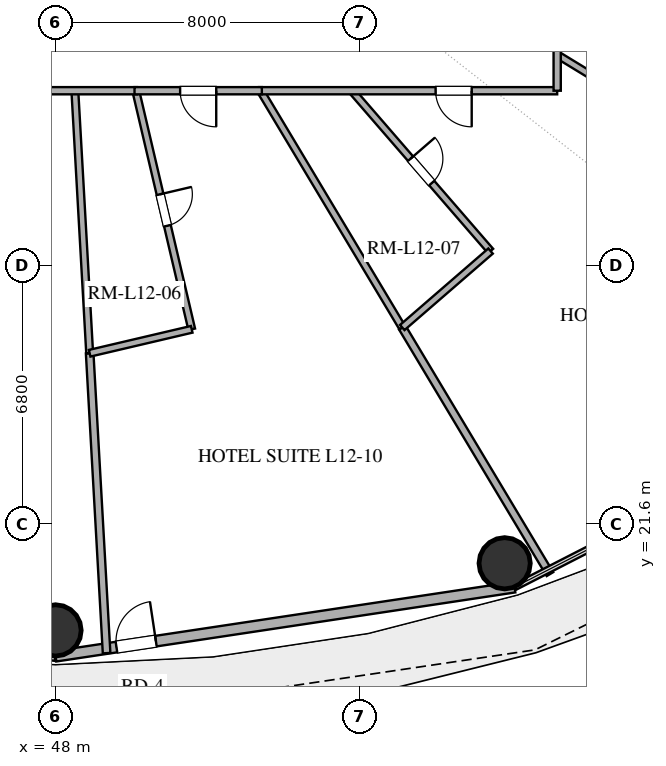
"""IFC4 building model, lengths in metres.
Left out: names, types, materials, properties, quantities, classifications, styles, units other than length and angle.
Written with IfcOpenShell. Run it as: python <this file> out.ifc"""

import sys

from ifc_helpers import new_model, si_unit, direction, frame, frame_2d, origin, origin_2d, place, context, subcontext, project, spatial, rectangle, hollow_circle, extrude, element, fill, save


model = new_model("IFC4")
c1 = context("Model", 3, precision=1e-05, world=origin(), true_north=direction((0.0, 1.0)))
c2 = subcontext(c1, "Body", "Model", "MODEL_VIEW")
j1 = project(units=[si_unit("LENGTHUNIT", "METRE"), si_unit("PLANEANGLEUNIT", "RADIAN")], contexts=[c1])
p1 = place(None, origin())
s1 = spatial("IfcSite", under=j1, at=p1, CompositionType="ELEMENT")
p2 = place(p1, origin())
s2 = spatial("IfcBuilding", under=s1, at=p2, CompositionType="ELEMENT")
p3 = place(p2, frame((0.0, 0.0, 53.4)))
s3 = spatial("IfcBuildingStorey", under=s2, at=p3, CompositionType="ELEMENT", Elevation=53.4)
for number, where, z_axis, x_axis in (
    (1, (48.0, 18.8, 0.0), (0.0, 0.0, 1.0), (1.0, 0.0, 0.0)),
    (2, (59.818, 20.566, 0.0), (0.0, 0.0, 1.0), (1.0, 0.0, 0.0)),
):
    element("IfcColumn", number, at=place(p3, frame(where, z_axis=z_axis, x_axis=x_axis)), inside=s3, PredefinedType="COLUMN", context=c2, shape_type="SweptSolid", body=[
        extrude(hollow_circle(Radius=0.675, WallThickness=0.036, at=origin_2d()), origin(), (0.0, 0.0, 1.0), 3.38),
    ])
p4 = place(p3, frame((35.922, 19.938, 0.0), z_axis=(0.0, 0.0, 1.0), x_axis=(0.988864835849, -0.148816452121, 0.0)))
e3 = element("IfcWall", 3, at=p4, inside=s3, PredefinedType="SOLIDWALL", context=c2, shape_type="SweptSolid", body=[
    extrude(rectangle(XDim=12.214, YDim=0.25, at=frame_2d((6.107, 0.0))), origin(), (0.0, 0.0, 1.0), 3.38),
])
p5 = place(p4, frame((2.139, 0.0, 1.42)))
e4 = element("IfcOpeningElement", 4, at=p5, cuts=e3, PredefinedType="OPENING", context=c2, shape_type="SweptSolid", body=[
    extrude(rectangle(XDim=1.0, YDim=1.05, at=frame_2d((0.5, 0.525))), frame((0.0, 0.135, 0.0), z_axis=(0.0, -1.0, 0.0), x_axis=(1.0, 0.0, 0.0)), (0.0, 0.0, 1.0), 0.27),
])
p6 = place(p3, frame((48.0, 18.12, 0.0), z_axis=(0.0, 0.0, 1.0), x_axis=(0.988864835849, 0.148816452121, 0.0)))
e5 = element("IfcWall", 5, at=p6, inside=s3, PredefinedType="SOLIDWALL", context=c2, shape_type="SweptSolid", body=[
    extrude(rectangle(XDim=12.214, YDim=0.28, at=frame_2d((6.107, 0.0))), origin(), (0.0, 0.0, 1.0), 3.38),
])
p7 = place(p6, frame((1.621, 0.0, 0.0)))
e6 = element("IfcOpeningElement", 6, at=p7, cuts=e5, PredefinedType="OPENING", context=c2, shape_type="SweptSolid", body=[
    extrude(rectangle(XDim=1.05, YDim=2.2, at=frame_2d((0.525, 1.1))), frame((0.0, 0.15, 0.0), z_axis=(0.0, -1.0, 0.0), x_axis=(1.0, 0.0, 0.0)), (0.0, 0.0, 1.0), 0.3),
])
p8 = place(p3, frame((49.344, 18.201, 0.0), z_axis=(0.0, 0.0, 1.0), x_axis=(-0.056375038978, 0.998409662904, 0.0)))
e7 = element("IfcWall", 7, at=p8, inside=s3, PredefinedType="PARTITIONING", context=c2, shape_type="SweptSolid", body=[
    extrude(rectangle(XDim=7.903, YDim=0.2, at=frame_2d((3.952, 0.0))), origin(), (0.0, 0.0, 1.0), 2.74),
])
p9 = place(p3, frame((61.01, 20.281, 0.0), z_axis=(0.0, 0.0, 1.0), x_axis=(-0.513892719639, 0.857854458928, 0.0)))
e8 = element("IfcWall", 8, at=p9, inside=s3, PredefinedType="PARTITIONING", context=c2, shape_type="SweptSolid", body=[
    extrude(rectangle(XDim=7.563, YDim=0.2, at=frame_2d((3.781, 0.0))), origin(), (0.0, 0.0, 1.0), 2.74),
])
p10 = place(p3, frame((57.124, 26.769, 0.0), z_axis=(0.0, 0.0, 1.0), x_axis=(-0.513872793929, 0.857866394994, 0.0)))
e9 = element("IfcWall", 9, at=p10, inside=s3, PredefinedType="PLUMBINGWALL", context=c2, shape_type="SweptSolid", body=[
    extrude(rectangle(XDim=7.263, YDim=0.18, at=frame_2d((3.632, 0.0))), origin(), (0.0, 0.0, 1.0), 2.74),
])
p11 = place(p3, frame((48.898, 26.092, 0.0), z_axis=(0.0, 0.0, 1.0), x_axis=(-0.056353367692, 0.998410886334, 0.0)))
e10 = element("IfcWall", 10, at=p11, inside=s3, PredefinedType="PLUMBINGWALL", context=c2, shape_type="SweptSolid", body=[
    extrude(rectangle(XDim=6.919, YDim=0.18, at=frame_2d((3.459, 0.0))), origin(), (0.0, 0.0, 1.0), 2.74),
])
p12 = place(p3, frame((50.111, 33.0, 0.0), z_axis=(0.0, 0.0, 1.0), x_axis=(0.228380862789, -0.973571867666, 0.0)))
e11 = element("IfcWall", 11, at=p12, inside=s3, PredefinedType="PLUMBINGWALL", context=c2, shape_type="SweptSolid", body=[
    extrude(rectangle(XDim=6.448, YDim=0.18, at=frame_2d((3.224, 0.0))), origin(), (0.0, 0.0, 1.0), 2.74),
])
p13 = place(p12, frame((2.799, 0.0, 0.0)))
e12 = element("IfcOpeningElement", 12, at=p13, cuts=e11, PredefinedType="OPENING", context=c2, shape_type="SweptSolid", body=[
    extrude(rectangle(XDim=0.85, YDim=2.1, at=frame_2d((0.425, 1.05))), frame((0.0, 0.1, 0.0), z_axis=(0.0, -1.0, 0.0), x_axis=(1.0, 0.0, 0.0)), (0.0, 0.0, 1.0), 0.2),
])
p14 = place(p3, frame((66.323, 30.822, 0.0), z_axis=(0.0, 0.0, 1.0), x_axis=(-0.853693843866, 0.52077521153, 0.0)))
e13 = element("IfcWall", 13, at=p14, inside=s3, PredefinedType="PLUMBINGWALL", context=c2, shape_type="SweptSolid", body=[
    extrude(rectangle(XDim=6.002, YDim=0.18, at=frame_2d((3.001, 0.0))), origin(), (0.0, 0.0, 1.0), 2.74),
])
p15 = place(p3, frame((55.794, 33.0, 0.0), z_axis=(0.0, 0.0, 1.0), x_axis=(0.654630697525, -0.755948840767, 0.0)))
e14 = element("IfcWall", 14, at=p15, inside=s3, PredefinedType="PLUMBINGWALL", context=c2, shape_type="SweptSolid", body=[
    extrude(rectangle(XDim=5.581, YDim=0.18, at=frame_2d((2.791, 0.0))), origin(), (0.0, 0.0, 1.0), 2.74),
])
p16 = place(p15, frame((2.365, 0.0, 0.0)))
e15 = element("IfcOpeningElement", 15, at=p16, cuts=e14, PredefinedType="OPENING", context=c2, shape_type="SweptSolid", body=[
    extrude(rectangle(XDim=0.85, YDim=2.1, at=frame_2d((0.425, 1.05))), frame((0.0, 0.1, 0.0), z_axis=(0.0, -1.0, 0.0), x_axis=(1.0, 0.0, 0.0)), (0.0, 0.0, 1.0), 0.2),
])
p17 = place(p3, frame((61.2, 33.0, 0.0), z_axis=(0.0, 0.0, 1.0), x_axis=(-1.0, 0.0, 0.0)))
e16 = element("IfcWall", 16, at=p17, inside=s3, PredefinedType="PARTITIONING", context=c2, shape_type="SweptSolid", body=[
    extrude(rectangle(XDim=7.846, YDim=0.19, at=frame_2d((3.923, 0.0))), origin(), (0.0, 0.0, 1.0), 2.74),
])
p18 = place(p17, frame((2.249, 0.0, 0.0)))
e17 = element("IfcOpeningElement", 17, at=p18, cuts=e16, PredefinedType="OPENING", context=c2, shape_type="SweptSolid", body=[
    extrude(rectangle(XDim=0.95, YDim=2.15, at=frame_2d((0.475, 1.075))), frame((0.0, 0.105, 0.0), z_axis=(0.0, -1.0, 0.0), x_axis=(1.0, 0.0, 0.0)), (0.0, 0.0, 1.0), 0.21),
])
p19 = place(p3, frame((50.144, 33.0, 0.0), z_axis=(0.0, 0.0, 1.0), x_axis=(-1.0, 0.0, 0.0)))
e18 = element("IfcWall", 18, at=p19, inside=s3, PredefinedType="PARTITIONING", context=c2, shape_type="SweptSolid", body=[
    extrude(rectangle(XDim=15.344, YDim=0.19, at=frame_2d((7.672, 0.0))), origin(), (0.0, 0.0, 1.0), 2.74),
])
p20 = place(p19, frame((3.438, 0.0, 0.0)))
e19 = element("IfcOpeningElement", 19, at=p20, cuts=e18, PredefinedType="OPENING", context=c2, shape_type="SweptSolid", body=[
    extrude(rectangle(XDim=1.0, YDim=2.2, at=frame_2d((0.5, 1.1))), frame((0.0, 0.105, 0.0), z_axis=(0.0, -1.0, 0.0), x_axis=(1.0, 0.0, 0.0)), (0.0, 0.0, 1.0), 0.21),
])
p21 = place(p19, frame((7.798, 0.0, 0.0)))
e20 = element("IfcOpeningElement", 20, at=p21, cuts=e18, PredefinedType="OPENING", context=c2, shape_type="SweptSolid", body=[
    extrude(rectangle(XDim=0.95, YDim=2.15, at=frame_2d((0.475, 1.075))), frame((0.0, 0.105, 0.0), z_axis=(0.0, -1.0, 0.0), x_axis=(1.0, 0.0, 0.0)), (0.0, 0.0, 1.0), 0.21),
])
p22 = place(p3, frame((61.2, 41.18, 0.0), z_axis=(0.0, 0.0, 1.0), x_axis=(0.0, -1.0, 0.0)))
e21 = element("IfcWall", 21, at=p22, inside=s3, PredefinedType="PARTITIONING", context=c2, shape_type="SweptSolid", body=[
    extrude(rectangle(XDim=8.18, YDim=0.19, at=frame_2d((4.09, 0.0))), origin(), (0.0, 0.0, 1.0), 2.74),
])
p23 = place(p22, frame((1.721, 0.0, 0.0)))
e22 = element("IfcOpeningElement", 22, at=p23, cuts=e21, PredefinedType="OPENING", context=c2, shape_type="SweptSolid", body=[
    extrude(rectangle(XDim=0.95, YDim=2.15, at=frame_2d((0.475, 1.075))), frame((0.0, 0.105, 0.0), z_axis=(0.0, -1.0, 0.0), x_axis=(1.0, 0.0, 0.0)), (0.0, 0.0, 1.0), 0.21),
])
p24 = place(p3, frame((53.429, 33.0, 0.0), z_axis=(0.0, 0.0, 1.0), x_axis=(-1.0, 0.0, 0.0)))
e23 = element("IfcWall", 23, at=p24, inside=s3, PredefinedType="PARTITIONING", context=c2, shape_type="SweptSolid", body=[
    extrude(rectangle(XDim=3.351, YDim=0.19, at=frame_2d((1.675, 0.0))), origin(), (0.0, 0.0, 1.0), 2.74),
])
p25 = place(p24, frame((1.2, 0.0, 0.0)))
e24 = element("IfcOpeningElement", 24, at=p25, cuts=e23, PredefinedType="OPENING", context=c2, shape_type="SweptSolid", body=[
    extrude(rectangle(XDim=0.95, YDim=2.15, at=frame_2d((0.475, 1.075))), frame((0.0, 0.105, 0.0), z_axis=(0.0, -1.0, 0.0), x_axis=(1.0, 0.0, 0.0)), (0.0, 0.0, 1.0), 0.21),
])
p26 = place(p3, frame((59.447, 28.781, 0.0), z_axis=(0.0, 0.0, 1.0), x_axis=(-0.755927521829, -0.654655315217, 0.0)))
e25 = element("IfcWall", 25, at=p26, inside=s3, PredefinedType="PLUMBINGWALL", context=c2, shape_type="SweptSolid", body=[
    extrude(rectangle(XDim=3.074, YDim=0.18, at=frame_2d((1.537, 0.0))), origin(), (0.0, 0.0, 1.0), 2.74),
])
p27 = place(p3, frame((51.583, 26.722, 0.0), z_axis=(0.0, 0.0, 1.0), x_axis=(-0.973579428385, -0.228348629567, 0.0)))
e26 = element("IfcWall", 26, at=p27, inside=s3, PredefinedType="PLUMBINGWALL", context=c2, shape_type="SweptSolid", body=[
    extrude(rectangle(XDim=2.759, YDim=0.18, at=frame_2d((1.379, 0.0))), origin(), (0.0, 0.0, 1.0), 2.74),
])
p28 = place(p7, origin())
e27 = element("IfcDoor", 27, at=p28, inside=s3, OperationType="SINGLE_SWING_RIGHT", PredefinedType="DOOR", context=c2, shape_type="SweptSolid", body=[
    extrude(rectangle(XDim=1.05, YDim=2.2, at=frame_2d((0.525, 1.1))), frame((0.0, 0.025, 0.0), z_axis=(0.0, -1.0, 0.0), x_axis=(1.0, 0.0, 0.0)), (0.0, 0.0, 1.0), 0.05),
])
fill(e6, e27)
p29 = place(p13, origin())
e28 = element("IfcDoor", 28, at=p29, inside=s3, OperationType="SINGLE_SWING_LEFT", PredefinedType="DOOR", context=c2, shape_type="SweptSolid", body=[
    extrude(rectangle(XDim=0.85, YDim=2.1, at=frame_2d((0.425, 1.05))), frame((0.0, 0.025, 0.0), z_axis=(0.0, -1.0, 0.0), x_axis=(1.0, 0.0, 0.0)), (0.0, 0.0, 1.0), 0.05),
])
fill(e12, e28)
p30 = place(p16, origin())
e29 = element("IfcDoor", 29, at=p30, inside=s3, OperationType="SINGLE_SWING_LEFT", PredefinedType="DOOR", context=c2, shape_type="SweptSolid", body=[
    extrude(rectangle(XDim=0.85, YDim=2.1, at=frame_2d((0.425, 1.05))), frame((0.0, 0.025, 0.0), z_axis=(0.0, -1.0, 0.0), x_axis=(1.0, 0.0, 0.0)), (0.0, 0.0, 1.0), 0.05),
])
fill(e15, e29)
p31 = place(p18, origin())
e30 = element("IfcDoor", 30, at=p31, inside=s3, OperationType="SINGLE_SWING_LEFT", PredefinedType="DOOR", context=c2, shape_type="SweptSolid", body=[
    extrude(rectangle(XDim=0.95, YDim=2.15, at=frame_2d((0.475, 1.075))), frame((0.0, 0.025, 0.0), z_axis=(0.0, -1.0, 0.0), x_axis=(1.0, 0.0, 0.0)), (0.0, 0.0, 1.0), 0.05),
])
fill(e17, e30)
p32 = place(p25, origin())
e31 = element("IfcDoor", 31, at=p32, inside=s3, OperationType="SINGLE_SWING_LEFT", PredefinedType="DOOR", context=c2, shape_type="SweptSolid", body=[
    extrude(rectangle(XDim=0.95, YDim=2.15, at=frame_2d((0.475, 1.075))), frame((0.0, 0.025, 0.0), z_axis=(0.0, -1.0, 0.0), x_axis=(1.0, 0.0, 0.0)), (0.0, 0.0, 1.0), 0.05),
])
fill(e24, e31)
save(model, sys.argv[1])
